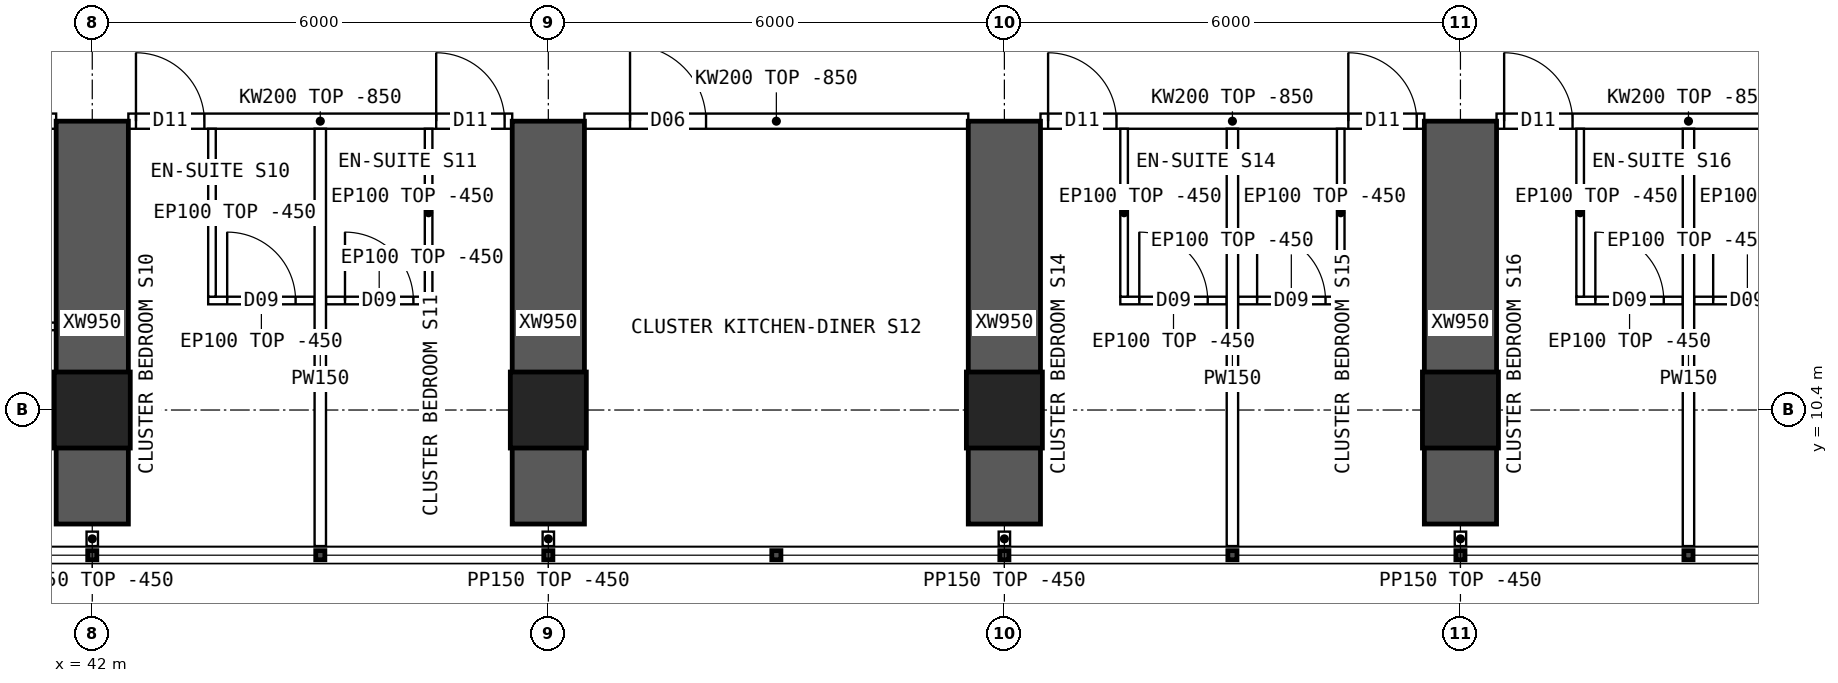
"""IFC4 building model, lengths in metres.
Left out: names, types, materials, properties, quantities, classifications, styles, units other than length and angle.
Written with IfcOpenShell. Run it as: python <this file> out.ifc"""

import sys

from ifc_helpers import new_model, si_unit, direction, frame, frame_2d, origin, origin_2d, place, context, subcontext, project, spatial, polyline, rectangle, hollow_rectangle, outline, extrude, element, fill, save


model = new_model("IFC4")
c1 = context("Model", 3, precision=1e-05, world=origin(), true_north=direction((0.0, 1.0)))
c2 = subcontext(c1, "Body", "Model", "MODEL_VIEW")
j1 = project(units=[si_unit("LENGTHUNIT", "METRE"), si_unit("PLANEANGLEUNIT", "RADIAN")], contexts=[c1])
p1 = place(None, origin())
s1 = spatial("IfcSite", under=j1, at=p1, CompositionType="ELEMENT")
p2 = place(p1, origin())
s2 = spatial("IfcBuilding", under=s1, at=p2, CompositionType="ELEMENT")
p3 = place(p2, frame((0.0, 0.0, 95.65)))
s3 = spatial("IfcBuildingStorey", under=s2, at=p3, CompositionType="ELEMENT", Elevation=95.65)
for number, where, z_axis, x_axis in (
    (1, (42.0, 10.4, 0.0), (0.0, 0.0, 1.0), (1.0, 0.0, 0.0)),
    (2, (48.0, 10.4, 0.0), (0.0, 0.0, 1.0), (1.0, 0.0, 0.0)),
    (3, (54.0, 10.4, 0.0), (0.0, 0.0, 1.0), (1.0, 0.0, 0.0)),
    (4, (60.0, 10.4, 0.0), (0.0, 0.0, 1.0), (1.0, 0.0, 0.0)),
):
    element("IfcColumn", number, at=place(p3, frame(where, z_axis=z_axis, x_axis=x_axis)), inside=s3, PredefinedType="COLUMN", context=c2, shape_type="SweptSolid", body=[
        extrude(hollow_rectangle(XDim=1.0, YDim=1.0, WallThickness=0.1, at=origin_2d()), origin(), (0.0, 0.0, 1.0), 3.75),
    ])
for number, where, z_axis, x_axis in (
    (5, (42.0, 8.9, 0.0), (0.0, 0.0, 1.0), (0.0, 1.0, 0.0)),
    (6, (48.0, 8.9, 0.0), (0.0, 0.0, 1.0), (0.0, 1.0, 0.0)),
    (7, (54.0, 8.9, 0.0), (0.0, 0.0, 1.0), (0.0, 1.0, 0.0)),
    (8, (60.0, 8.9, 0.0), (0.0, 0.0, 1.0), (0.0, 1.0, 0.0)),
):
    element("IfcWall", number, at=place(p3, frame(where, z_axis=z_axis, x_axis=x_axis)), inside=s3, PredefinedType="SHEAR", context=c2, shape_type="SweptSolid", body=[
        extrude(rectangle(XDim=5.3, YDim=0.95, at=frame_2d((2.65, 0.0))), origin(), (0.0, 0.0, 1.0), 3.75),
    ])
p4 = place(p3, frame((36.475, 14.2, 0.0), z_axis=(0.0, 0.0, 1.0), x_axis=(1.0, 0.0, 0.0)))
e9 = element("IfcWall", 9, at=p4, inside=s3, PredefinedType="SOLIDWALL", context=c2, shape_type="SweptSolid", body=[
    extrude(outline(polyline([(0.0, 0.0), (5.05, 0.0), (5.05, 2.9), (0.0, 2.9), (0.0, 0.0)])), frame((0.0, 0.1, 0.0), z_axis=(0.0, -1.0, 0.0), x_axis=(1.0, 0.0, 0.0)), (0.0, 0.0, 1.0), 0.2),
])
p5 = place(p4, frame((0.3, 0.0, 0.0)))
e10 = element("IfcOpeningElement", 10, at=p5, cuts=e9, PredefinedType="OPENING", context=c2, shape_type="SweptSolid", body=[
    extrude(rectangle(XDim=1.0, YDim=2.1, at=frame_2d((0.5, 1.05))), frame((0.0, 0.11, 0.0), z_axis=(0.0, -1.0, 0.0), x_axis=(1.0, 0.0, 0.0)), (0.0, 0.0, 1.0), 0.22),
])
p6 = place(p3, frame((42.475, 14.2, 0.0), z_axis=(0.0, 0.0, 1.0), x_axis=(1.0, 0.0, 0.0)))
e11 = element("IfcWall", 11, at=p6, inside=s3, PredefinedType="SOLIDWALL", context=c2, shape_type="SweptSolid", body=[
    extrude(outline(polyline([(0.0, 0.0), (5.05, 0.0), (5.05, 2.9), (0.0, 2.9), (0.0, 0.0)])), frame((0.0, 0.1, 0.0), z_axis=(0.0, -1.0, 0.0), x_axis=(1.0, 0.0, 0.0)), (0.0, 0.0, 1.0), 0.2),
])
p7 = place(p6, frame((0.1, 0.0, 0.0)))
e12 = element("IfcOpeningElement", 12, at=p7, cuts=e11, PredefinedType="OPENING", context=c2, shape_type="SweptSolid", body=[
    extrude(rectangle(XDim=0.9, YDim=2.1, at=frame_2d((0.45, 1.05))), frame((0.0, 0.11, 0.0), z_axis=(0.0, -1.0, 0.0), x_axis=(1.0, 0.0, 0.0)), (0.0, 0.0, 1.0), 0.22),
])
p8 = place(p6, frame((4.05, 0.0, 0.0)))
e13 = element("IfcOpeningElement", 13, at=p8, cuts=e11, PredefinedType="OPENING", context=c2, shape_type="SweptSolid", body=[
    extrude(rectangle(XDim=0.9, YDim=2.1, at=frame_2d((0.45, 1.05))), frame((0.0, 0.11, 0.0), z_axis=(0.0, -1.0, 0.0), x_axis=(1.0, 0.0, 0.0)), (0.0, 0.0, 1.0), 0.22),
])
p9 = place(p3, frame((48.475, 14.2, 0.0), z_axis=(0.0, 0.0, 1.0), x_axis=(1.0, 0.0, 0.0)))
e14 = element("IfcWall", 14, at=p9, inside=s3, PredefinedType="SOLIDWALL", context=c2, shape_type="SweptSolid", body=[
    extrude(outline(polyline([(0.0, 0.0), (5.05, 0.0), (5.05, 2.9), (0.0, 2.9), (0.0, 0.0)])), frame((0.0, 0.1, 0.0), z_axis=(0.0, -1.0, 0.0), x_axis=(1.0, 0.0, 0.0)), (0.0, 0.0, 1.0), 0.2),
])
p10 = place(p9, frame((0.6, 0.0, 0.0)))
e15 = element("IfcOpeningElement", 15, at=p10, cuts=e14, PredefinedType="OPENING", context=c2, shape_type="SweptSolid", body=[
    extrude(rectangle(XDim=1.0, YDim=2.1, at=frame_2d((0.5, 1.05))), frame((0.0, 0.11, 0.0), z_axis=(0.0, -1.0, 0.0), x_axis=(1.0, 0.0, 0.0)), (0.0, 0.0, 1.0), 0.22),
])
p11 = place(p3, frame((54.475, 14.2, 0.0), z_axis=(0.0, 0.0, 1.0), x_axis=(1.0, 0.0, 0.0)))
e16 = element("IfcWall", 16, at=p11, inside=s3, PredefinedType="SOLIDWALL", context=c2, shape_type="SweptSolid", body=[
    extrude(outline(polyline([(0.0, 0.0), (5.05, 0.0), (5.05, 2.9), (0.0, 2.9), (0.0, 0.0)])), frame((0.0, 0.1, 0.0), z_axis=(0.0, -1.0, 0.0), x_axis=(1.0, 0.0, 0.0)), (0.0, 0.0, 1.0), 0.2),
])
p12 = place(p11, frame((0.1, 0.0, 0.0)))
e17 = element("IfcOpeningElement", 17, at=p12, cuts=e16, PredefinedType="OPENING", context=c2, shape_type="SweptSolid", body=[
    extrude(rectangle(XDim=0.9, YDim=2.1, at=frame_2d((0.45, 1.05))), frame((0.0, 0.11, 0.0), z_axis=(0.0, -1.0, 0.0), x_axis=(1.0, 0.0, 0.0)), (0.0, 0.0, 1.0), 0.22),
])
p13 = place(p11, frame((4.05, 0.0, 0.0)))
e18 = element("IfcOpeningElement", 18, at=p13, cuts=e16, PredefinedType="OPENING", context=c2, shape_type="SweptSolid", body=[
    extrude(rectangle(XDim=0.9, YDim=2.1, at=frame_2d((0.45, 1.05))), frame((0.0, 0.11, 0.0), z_axis=(0.0, -1.0, 0.0), x_axis=(1.0, 0.0, 0.0)), (0.0, 0.0, 1.0), 0.22),
])
p14 = place(p3, frame((60.475, 14.2, 0.0), z_axis=(0.0, 0.0, 1.0), x_axis=(1.0, 0.0, 0.0)))
e19 = element("IfcWall", 19, at=p14, inside=s3, PredefinedType="SOLIDWALL", context=c2, shape_type="SweptSolid", body=[
    extrude(outline(polyline([(0.0, 0.0), (5.05, 0.0), (5.05, 2.9), (0.0, 2.9), (0.0, 0.0)])), frame((0.0, 0.1, 0.0), z_axis=(0.0, -1.0, 0.0), x_axis=(1.0, 0.0, 0.0)), (0.0, 0.0, 1.0), 0.2),
])
p15 = place(p14, frame((0.1, 0.0, 0.0)))
e20 = element("IfcOpeningElement", 20, at=p15, cuts=e19, PredefinedType="OPENING", context=c2, shape_type="SweptSolid", body=[
    extrude(rectangle(XDim=0.9, YDim=2.1, at=frame_2d((0.45, 1.05))), frame((0.0, 0.11, 0.0), z_axis=(0.0, -1.0, 0.0), x_axis=(1.0, 0.0, 0.0)), (0.0, 0.0, 1.0), 0.22),
])
p16 = place(p14, frame((4.05, 0.0, 0.0)))
e21 = element("IfcOpeningElement", 21, at=p16, cuts=e19, PredefinedType="OPENING", context=c2, shape_type="SweptSolid", body=[
    extrude(rectangle(XDim=0.9, YDim=2.1, at=frame_2d((0.45, 1.05))), frame((0.0, 0.11, 0.0), z_axis=(0.0, -1.0, 0.0), x_axis=(1.0, 0.0, 0.0)), (0.0, 0.0, 1.0), 0.22),
])
p17 = place(p3, frame((38.875, 11.5, 0.0), z_axis=(0.0, 0.0, 1.0), x_axis=(1.0, 0.0, 0.0)))
e22 = element("IfcWall", 22, at=p17, inside=s3, PredefinedType="PARTITIONING", context=c2, shape_type="SweptSolid", body=[
    extrude(rectangle(XDim=2.65, YDim=0.1, at=frame_2d((1.325, 0.0))), origin(), (0.0, 0.0, 1.0), 3.3),
])
p18 = place(p3, frame((45.0, 8.61, 0.0), z_axis=(0.0, 0.0, 1.0), x_axis=(0.0, 1.0, 0.0)))
e23 = element("IfcWall", 23, at=p18, inside=s3, PredefinedType="PARTITIONING", context=c2, shape_type="SweptSolid", body=[
    extrude(outline(polyline([(0.0, 0.0), (5.49, 0.0), (5.49, 2.9), (5.442, 2.9), (5.44, 3.3), (1.992, 3.3), (1.99, 2.9), (1.592, 2.9), (1.59, 3.3), (0.0, 3.3), (0.0, 0.0)])), frame((0.0, 0.075, 0.0), z_axis=(0.0, -1.0, 0.0), x_axis=(1.0, 0.0, 0.0)), (0.0, 0.0, 1.0), 0.15),
])
p19 = place(p3, frame((44.925, 11.841, 0.0), z_axis=(0.0, 0.0, 1.0), x_axis=(-1.0, 0.0, 0.0)))
e24 = element("IfcWall", 24, at=p19, inside=s3, PredefinedType="PARTITIONING", context=c2, shape_type="SweptSolid", body=[
    extrude(rectangle(XDim=1.4, YDim=0.1, at=frame_2d((0.7, 0.0))), origin(), (0.0, 0.0, 1.0), 3.3),
])
p20 = place(p19, frame((0.25, 0.0, 0.0)))
e25 = element("IfcOpeningElement", 25, at=p20, cuts=e24, PredefinedType="OPENING", context=c2, shape_type="SweptSolid", body=[
    extrude(rectangle(XDim=0.9, YDim=2.1, at=frame_2d((0.45, 1.05))), frame((0.0, 0.06, 0.0), z_axis=(0.0, -1.0, 0.0), x_axis=(1.0, 0.0, 0.0)), (0.0, 0.0, 1.0), 0.12),
])
p21 = place(p3, frame((43.575, 11.891, 0.0), z_axis=(0.0, 0.0, 1.0), x_axis=(0.0, 1.0, 0.0)))
e26 = element("IfcWall", 26, at=p21, inside=s3, PredefinedType="PARTITIONING", context=c2, shape_type="SweptSolid", body=[
    extrude(outline(polyline([(0.0, 0.0), (2.209, 0.0), (2.209, 2.9), (2.161, 2.9), (2.159, 3.3), (0.0, 3.3), (0.0, 0.0)])), frame((0.0, 0.05, 0.0), z_axis=(0.0, -1.0, 0.0), x_axis=(1.0, 0.0, 0.0)), (0.0, 0.0, 1.0), 0.1),
])
p22 = place(p3, frame((46.475, 11.841, 0.0), z_axis=(0.0, 0.0, 1.0), x_axis=(-1.0, 0.0, 0.0)))
e27 = element("IfcWall", 27, at=p22, inside=s3, PredefinedType="PARTITIONING", context=c2, shape_type="SweptSolid", body=[
    extrude(rectangle(XDim=1.4, YDim=0.1, at=frame_2d((0.7, 0.0))), origin(), (0.0, 0.0, 1.0), 3.3),
])
p23 = place(p22, frame((0.25, 0.0, 0.0)))
e28 = element("IfcOpeningElement", 28, at=p23, cuts=e27, PredefinedType="OPENING", context=c2, shape_type="SweptSolid", body=[
    extrude(rectangle(XDim=0.9, YDim=2.1, at=frame_2d((0.45, 1.05))), frame((0.0, 0.06, 0.0), z_axis=(0.0, -1.0, 0.0), x_axis=(1.0, 0.0, 0.0)), (0.0, 0.0, 1.0), 0.12),
])
p24 = place(p3, frame((46.425, 11.891, 0.0), z_axis=(0.0, 0.0, 1.0), x_axis=(0.0, 1.0, 0.0)))
e29 = element("IfcWall", 29, at=p24, inside=s3, PredefinedType="PARTITIONING", context=c2, shape_type="SweptSolid", body=[
    extrude(outline(polyline([(0.0, 0.0), (2.209, 0.0), (2.209, 2.9), (2.161, 2.9), (2.159, 3.3), (0.0, 3.3), (0.0, 0.0)])), frame((0.0, 0.05, 0.0), z_axis=(0.0, -1.0, 0.0), x_axis=(1.0, 0.0, 0.0)), (0.0, 0.0, 1.0), 0.1),
])
p25 = place(p3, frame((57.0, 8.61, 0.0), z_axis=(0.0, 0.0, 1.0), x_axis=(0.0, 1.0, 0.0)))
e30 = element("IfcWall", 30, at=p25, inside=s3, PredefinedType="PARTITIONING", context=c2, shape_type="SweptSolid", body=[
    extrude(outline(polyline([(0.0, 0.0), (5.49, 0.0), (5.49, 2.9), (5.442, 2.9), (5.44, 3.3), (1.992, 3.3), (1.99, 2.9), (1.592, 2.9), (1.59, 3.3), (0.0, 3.3), (0.0, 0.0)])), frame((0.0, 0.075, 0.0), z_axis=(0.0, -1.0, 0.0), x_axis=(1.0, 0.0, 0.0)), (0.0, 0.0, 1.0), 0.15),
])
p26 = place(p3, frame((56.925, 11.841, 0.0), z_axis=(0.0, 0.0, 1.0), x_axis=(-1.0, 0.0, 0.0)))
e31 = element("IfcWall", 31, at=p26, inside=s3, PredefinedType="PARTITIONING", context=c2, shape_type="SweptSolid", body=[
    extrude(rectangle(XDim=1.4, YDim=0.1, at=frame_2d((0.7, 0.0))), origin(), (0.0, 0.0, 1.0), 3.3),
])
p27 = place(p26, frame((0.25, 0.0, 0.0)))
e32 = element("IfcOpeningElement", 32, at=p27, cuts=e31, PredefinedType="OPENING", context=c2, shape_type="SweptSolid", body=[
    extrude(rectangle(XDim=0.9, YDim=2.1, at=frame_2d((0.45, 1.05))), frame((0.0, 0.06, 0.0), z_axis=(0.0, -1.0, 0.0), x_axis=(1.0, 0.0, 0.0)), (0.0, 0.0, 1.0), 0.12),
])
p28 = place(p3, frame((55.575, 11.891, 0.0), z_axis=(0.0, 0.0, 1.0), x_axis=(0.0, 1.0, 0.0)))
e33 = element("IfcWall", 33, at=p28, inside=s3, PredefinedType="PARTITIONING", context=c2, shape_type="SweptSolid", body=[
    extrude(outline(polyline([(0.0, 0.0), (2.209, 0.0), (2.209, 2.9), (2.161, 2.9), (2.159, 3.3), (0.0, 3.3), (0.0, 0.0)])), frame((0.0, 0.05, 0.0), z_axis=(0.0, -1.0, 0.0), x_axis=(1.0, 0.0, 0.0)), (0.0, 0.0, 1.0), 0.1),
])
p29 = place(p3, frame((58.475, 11.841, 0.0), z_axis=(0.0, 0.0, 1.0), x_axis=(-1.0, 0.0, 0.0)))
e34 = element("IfcWall", 34, at=p29, inside=s3, PredefinedType="PARTITIONING", context=c2, shape_type="SweptSolid", body=[
    extrude(rectangle(XDim=1.4, YDim=0.1, at=frame_2d((0.7, 0.0))), origin(), (0.0, 0.0, 1.0), 3.3),
])
p30 = place(p29, frame((0.25, 0.0, 0.0)))
e35 = element("IfcOpeningElement", 35, at=p30, cuts=e34, PredefinedType="OPENING", context=c2, shape_type="SweptSolid", body=[
    extrude(rectangle(XDim=0.9, YDim=2.1, at=frame_2d((0.45, 1.05))), frame((0.0, 0.06, 0.0), z_axis=(0.0, -1.0, 0.0), x_axis=(1.0, 0.0, 0.0)), (0.0, 0.0, 1.0), 0.12),
])
p31 = place(p3, frame((58.425, 11.891, 0.0), z_axis=(0.0, 0.0, 1.0), x_axis=(0.0, 1.0, 0.0)))
e36 = element("IfcWall", 36, at=p31, inside=s3, PredefinedType="PARTITIONING", context=c2, shape_type="SweptSolid", body=[
    extrude(outline(polyline([(0.0, 0.0), (2.209, 0.0), (2.209, 2.9), (2.161, 2.9), (2.159, 3.3), (0.0, 3.3), (0.0, 0.0)])), frame((0.0, 0.05, 0.0), z_axis=(0.0, -1.0, 0.0), x_axis=(1.0, 0.0, 0.0)), (0.0, 0.0, 1.0), 0.1),
])
p32 = place(p3, frame((63.0, 8.61, 0.0), z_axis=(0.0, 0.0, 1.0), x_axis=(0.0, 1.0, 0.0)))
e37 = element("IfcWall", 37, at=p32, inside=s3, PredefinedType="PARTITIONING", context=c2, shape_type="SweptSolid", body=[
    extrude(outline(polyline([(0.0, 0.0), (5.49, 0.0), (5.49, 2.9), (5.442, 2.9), (5.44, 3.3), (1.992, 3.3), (1.99, 2.9), (1.592, 2.9), (1.59, 3.3), (0.0, 3.3), (0.0, 0.0)])), frame((0.0, 0.075, 0.0), z_axis=(0.0, -1.0, 0.0), x_axis=(1.0, 0.0, 0.0)), (0.0, 0.0, 1.0), 0.15),
])
p33 = place(p3, frame((62.925, 11.841, 0.0), z_axis=(0.0, 0.0, 1.0), x_axis=(-1.0, 0.0, 0.0)))
e38 = element("IfcWall", 38, at=p33, inside=s3, PredefinedType="PARTITIONING", context=c2, shape_type="SweptSolid", body=[
    extrude(rectangle(XDim=1.4, YDim=0.1, at=frame_2d((0.7, 0.0))), origin(), (0.0, 0.0, 1.0), 3.3),
])
p34 = place(p33, frame((0.25, 0.0, 0.0)))
e39 = element("IfcOpeningElement", 39, at=p34, cuts=e38, PredefinedType="OPENING", context=c2, shape_type="SweptSolid", body=[
    extrude(rectangle(XDim=0.9, YDim=2.1, at=frame_2d((0.45, 1.05))), frame((0.0, 0.06, 0.0), z_axis=(0.0, -1.0, 0.0), x_axis=(1.0, 0.0, 0.0)), (0.0, 0.0, 1.0), 0.12),
])
p35 = place(p3, frame((61.575, 11.891, 0.0), z_axis=(0.0, 0.0, 1.0), x_axis=(0.0, 1.0, 0.0)))
e40 = element("IfcWall", 40, at=p35, inside=s3, PredefinedType="PARTITIONING", context=c2, shape_type="SweptSolid", body=[
    extrude(outline(polyline([(0.0, 0.0), (2.209, 0.0), (2.209, 2.9), (2.161, 2.9), (2.159, 3.3), (0.0, 3.3), (0.0, 0.0)])), frame((0.0, 0.05, 0.0), z_axis=(0.0, -1.0, 0.0), x_axis=(1.0, 0.0, 0.0)), (0.0, 0.0, 1.0), 0.1),
])
p36 = place(p3, frame((64.475, 11.841, 0.0), z_axis=(0.0, 0.0, 1.0), x_axis=(-1.0, 0.0, 0.0)))
e41 = element("IfcWall", 41, at=p36, inside=s3, PredefinedType="PARTITIONING", context=c2, shape_type="SweptSolid", body=[
    extrude(rectangle(XDim=1.4, YDim=0.1, at=frame_2d((0.7, 0.0))), origin(), (0.0, 0.0, 1.0), 3.3),
])
p37 = place(p36, frame((0.25, 0.0, 0.0)))
e42 = element("IfcOpeningElement", 42, at=p37, cuts=e41, PredefinedType="OPENING", context=c2, shape_type="SweptSolid", body=[
    extrude(rectangle(XDim=0.9, YDim=2.1, at=frame_2d((0.45, 1.05))), frame((0.0, 0.06, 0.0), z_axis=(0.0, -1.0, 0.0), x_axis=(1.0, 0.0, 0.0)), (0.0, 0.0, 1.0), 0.12),
])
for number, where, z_axis, x_axis in (
    (43, (42.0, 8.8, 0.0), (0.0, 0.0, 1.0), (0.0, -1.0, 0.0)),
    (44, (48.0, 8.8, 0.0), (0.0, 0.0, 1.0), (0.0, -1.0, 0.0)),
    (45, (54.0, 8.8, 0.0), (0.0, 0.0, 1.0), (0.0, -1.0, 0.0)),
    (46, (60.0, 8.8, 0.0), (0.0, 0.0, 1.0), (0.0, -1.0, 0.0)),
):
    element("IfcWall", number, at=place(p3, frame(where, z_axis=z_axis, x_axis=x_axis)), inside=s3, PredefinedType="PARTITIONING", context=c2, shape_type="SweptSolid", body=[
        extrude(rectangle(XDim=0.19, YDim=0.15, at=frame_2d((0.095, 0.0))), origin(), (0.0, 0.0, 1.0), 3.3),
    ])
p38 = place(p20, origin())
e47 = element("IfcDoor", 47, at=p38, inside=s3, OperationType="SINGLE_SWING_RIGHT", PredefinedType="DOOR", context=c2, shape_type="SweptSolid", body=[
    extrude(rectangle(XDim=0.9, YDim=2.1, at=frame_2d((0.45, 1.05))), frame((0.0, 0.025, 0.0), z_axis=(0.0, -1.0, 0.0), x_axis=(1.0, 0.0, 0.0)), (0.0, 0.0, 1.0), 0.05),
])
fill(e25, e47)
p39 = place(p7, origin())
e48 = element("IfcDoor", 48, at=p39, inside=s3, OperationType="SINGLE_SWING_LEFT", PredefinedType="DOOR", context=c2, shape_type="SweptSolid", body=[
    extrude(rectangle(XDim=0.9, YDim=2.1, at=frame_2d((0.45, 1.05))), frame((0.0, 0.025, 0.0), z_axis=(0.0, -1.0, 0.0), x_axis=(1.0, 0.0, 0.0)), (0.0, 0.0, 1.0), 0.05),
])
fill(e12, e48)
p40 = place(p23, origin())
e49 = element("IfcDoor", 49, at=p40, inside=s3, OperationType="SINGLE_SWING_RIGHT", PredefinedType="DOOR", context=c2, shape_type="SweptSolid", body=[
    extrude(rectangle(XDim=0.9, YDim=2.1, at=frame_2d((0.45, 1.05))), frame((0.0, 0.025, 0.0), z_axis=(0.0, -1.0, 0.0), x_axis=(1.0, 0.0, 0.0)), (0.0, 0.0, 1.0), 0.05),
])
fill(e28, e49)
p41 = place(p8, origin())
e50 = element("IfcDoor", 50, at=p41, inside=s3, OperationType="SINGLE_SWING_LEFT", PredefinedType="DOOR", context=c2, shape_type="SweptSolid", body=[
    extrude(rectangle(XDim=0.9, YDim=2.1, at=frame_2d((0.45, 1.05))), frame((0.0, 0.025, 0.0), z_axis=(0.0, -1.0, 0.0), x_axis=(1.0, 0.0, 0.0)), (0.0, 0.0, 1.0), 0.05),
])
fill(e13, e50)
p42 = place(p10, origin())
e51 = element("IfcDoor", 51, at=p42, inside=s3, OperationType="SINGLE_SWING_LEFT", PredefinedType="DOOR", context=c2, shape_type="SweptSolid", body=[
    extrude(rectangle(XDim=1.0, YDim=2.1, at=frame_2d((0.5, 1.05))), frame((0.0, 0.025, 0.0), z_axis=(0.0, -1.0, 0.0), x_axis=(1.0, 0.0, 0.0)), (0.0, 0.0, 1.0), 0.05),
])
fill(e15, e51)
p43 = place(p27, origin())
e52 = element("IfcDoor", 52, at=p43, inside=s3, OperationType="SINGLE_SWING_RIGHT", PredefinedType="DOOR", context=c2, shape_type="SweptSolid", body=[
    extrude(rectangle(XDim=0.9, YDim=2.1, at=frame_2d((0.45, 1.05))), frame((0.0, 0.025, 0.0), z_axis=(0.0, -1.0, 0.0), x_axis=(1.0, 0.0, 0.0)), (0.0, 0.0, 1.0), 0.05),
])
fill(e32, e52)
p44 = place(p12, origin())
e53 = element("IfcDoor", 53, at=p44, inside=s3, OperationType="SINGLE_SWING_LEFT", PredefinedType="DOOR", context=c2, shape_type="SweptSolid", body=[
    extrude(rectangle(XDim=0.9, YDim=2.1, at=frame_2d((0.45, 1.05))), frame((0.0, 0.025, 0.0), z_axis=(0.0, -1.0, 0.0), x_axis=(1.0, 0.0, 0.0)), (0.0, 0.0, 1.0), 0.05),
])
fill(e17, e53)
p45 = place(p30, origin())
e54 = element("IfcDoor", 54, at=p45, inside=s3, OperationType="SINGLE_SWING_RIGHT", PredefinedType="DOOR", context=c2, shape_type="SweptSolid", body=[
    extrude(rectangle(XDim=0.9, YDim=2.1, at=frame_2d((0.45, 1.05))), frame((0.0, 0.025, 0.0), z_axis=(0.0, -1.0, 0.0), x_axis=(1.0, 0.0, 0.0)), (0.0, 0.0, 1.0), 0.05),
])
fill(e35, e54)
p46 = place(p13, origin())
e55 = element("IfcDoor", 55, at=p46, inside=s3, OperationType="SINGLE_SWING_LEFT", PredefinedType="DOOR", context=c2, shape_type="SweptSolid", body=[
    extrude(rectangle(XDim=0.9, YDim=2.1, at=frame_2d((0.45, 1.05))), frame((0.0, 0.025, 0.0), z_axis=(0.0, -1.0, 0.0), x_axis=(1.0, 0.0, 0.0)), (0.0, 0.0, 1.0), 0.05),
])
fill(e18, e55)
p47 = place(p34, origin())
e56 = element("IfcDoor", 56, at=p47, inside=s3, OperationType="SINGLE_SWING_RIGHT", PredefinedType="DOOR", context=c2, shape_type="SweptSolid", body=[
    extrude(rectangle(XDim=0.9, YDim=2.1, at=frame_2d((0.45, 1.05))), frame((0.0, 0.025, 0.0), z_axis=(0.0, -1.0, 0.0), x_axis=(1.0, 0.0, 0.0)), (0.0, 0.0, 1.0), 0.05),
])
fill(e39, e56)
p48 = place(p15, origin())
e57 = element("IfcDoor", 57, at=p48, inside=s3, OperationType="SINGLE_SWING_LEFT", PredefinedType="DOOR", context=c2, shape_type="SweptSolid", body=[
    extrude(rectangle(XDim=0.9, YDim=2.1, at=frame_2d((0.45, 1.05))), frame((0.0, 0.025, 0.0), z_axis=(0.0, -1.0, 0.0), x_axis=(1.0, 0.0, 0.0)), (0.0, 0.0, 1.0), 0.05),
])
fill(e20, e57)
p49 = place(p37, origin())
e58 = element("IfcDoor", 58, at=p49, inside=s3, OperationType="SINGLE_SWING_RIGHT", PredefinedType="DOOR", context=c2, shape_type="SweptSolid", body=[
    extrude(rectangle(XDim=0.9, YDim=2.1, at=frame_2d((0.45, 1.05))), frame((0.0, 0.025, 0.0), z_axis=(0.0, -1.0, 0.0), x_axis=(1.0, 0.0, 0.0)), (0.0, 0.0, 1.0), 0.05),
])
fill(e42, e58)
save(model, sys.argv[1])
